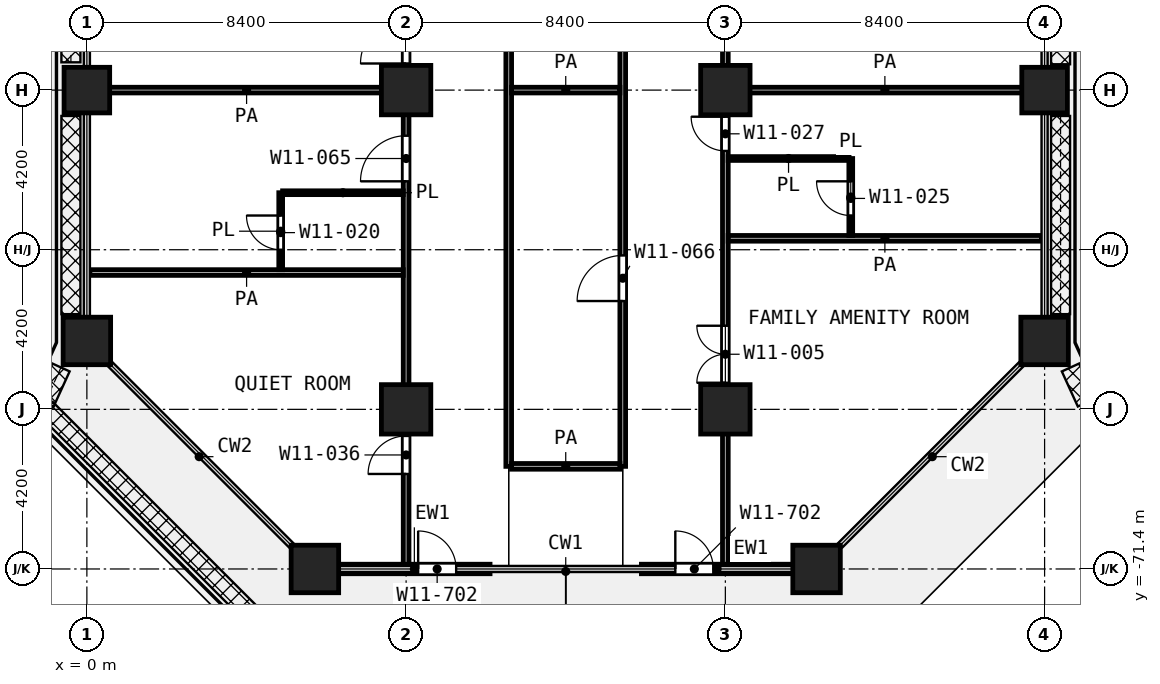
"""IFC4 building model, lengths in metres.
Left out: names, types, materials, properties, quantities, classifications, styles, units other than length and angle.
Written with IfcOpenShell. Run it as: python <this file> out.ifc"""

import sys

from ifc_helpers import new_model, si_unit, direction, frame, frame_2d, origin, origin_2d, place, context, subcontext, project, spatial, rectangle, extrude, element, fill, save


model = new_model("IFC4")
c1 = context("Model", 3, precision=1e-05, world=origin(), true_north=direction((0.0, 1.0)))
c2 = subcontext(c1, "Body", "Model", "MODEL_VIEW")
j1 = project(units=[si_unit("LENGTHUNIT", "METRE"), si_unit("PLANEANGLEUNIT", "RADIAN")], contexts=[c1])
p1 = place(None, origin())
s1 = spatial("IfcSite", under=j1, at=p1, CompositionType="ELEMENT")
p2 = place(p1, origin())
s2 = spatial("IfcBuilding", under=s1, at=p2, CompositionType="ELEMENT")
p3 = place(p2, frame((0.0, 0.0, 72.8)))
s3 = spatial("IfcBuildingStorey", under=s2, at=p3, CompositionType="ELEMENT", Elevation=72.8)
p4 = place(p3, frame((0.0, -58.8, 0.0), z_axis=(0.0, 0.0, 1.0), x_axis=(1.0, 0.0, 0.0)))
e1 = element("IfcColumn", 1, at=p4, inside=s3, PredefinedType="COLUMN", context=c2, shape_type="SweptSolid", body=[
    extrude(rectangle(XDim=1.2, YDim=1.2, at=origin_2d()), origin(), (0.0, 0.0, 1.0), 4.2),
])
for number, where, z_axis, x_axis in (
    (2, (8.4, -58.8, 0.0), (0.0, 0.0, 1.0), (1.0, 0.0, 0.0)),
    (3, (16.8, -58.8, 0.0), (0.0, 0.0, 1.0), (1.0, 0.0, 0.0)),
):
    element("IfcColumn", number, at=place(p3, frame(where, z_axis=z_axis, x_axis=x_axis)), inside=s3, PredefinedType="COLUMN", context=c2, shape_type="SweptSolid", body=[
        extrude(rectangle(XDim=1.3, YDim=1.3, at=origin_2d()), origin(), (0.0, 0.0, 1.0), 4.2),
    ])
p5 = place(p3, frame((25.2, -58.8, 0.0), z_axis=(0.0, 0.0, 1.0), x_axis=(1.0, 0.0, 0.0)))
e4 = element("IfcColumn", 4, at=p5, inside=s3, PredefinedType="COLUMN", context=c2, shape_type="SweptSolid", body=[
    extrude(rectangle(XDim=1.2, YDim=1.2, at=origin_2d()), origin(), (0.0, 0.0, 1.0), 4.2),
])
for number, where, z_axis, x_axis in (
    (5, (0.0, -65.4, 0.0), (0.0, 0.0, 1.0), (1.0, 0.0, 0.0)),
    (6, (25.2, -65.4, 0.0), (0.0, 0.0, 1.0), (1.0, 0.0, 0.0)),
):
    element("IfcColumn", number, at=place(p3, frame(where, z_axis=z_axis, x_axis=x_axis)), inside=s3, PredefinedType="COLUMN", context=c2, shape_type="SweptSolid", body=[
        extrude(rectangle(XDim=1.25, YDim=1.25, at=origin_2d()), origin(), (0.0, 0.0, 1.0), 4.2),
    ])
for number, where, z_axis, x_axis in (
    (7, (8.4, -67.2, 0.0), (0.0, 0.0, 1.0), (1.0, 0.0, 0.0)),
    (8, (16.8, -67.2, 0.0), (0.0, 0.0, 1.0), (1.0, 0.0, 0.0)),
):
    element("IfcColumn", number, at=place(p3, frame(where, z_axis=z_axis, x_axis=x_axis)), inside=s3, PredefinedType="COLUMN", context=c2, shape_type="SweptSolid", body=[
        extrude(rectangle(XDim=1.3, YDim=1.3, at=origin_2d()), origin(), (0.0, 0.0, 1.0), 4.2),
    ])
for number, where, z_axis, x_axis in (
    (9, (6.0, -71.4, 0.0), (0.0, 0.0, 1.0), (1.0, 0.0, 0.0)),
    (10, (19.2, -71.4, 0.0), (0.0, 0.0, 1.0), (1.0, 0.0, 0.0)),
):
    element("IfcColumn", number, at=place(p3, frame(where, z_axis=z_axis, x_axis=x_axis)), inside=s3, PredefinedType="COLUMN", context=c2, shape_type="SweptSolid", body=[
        extrude(rectangle(XDim=1.25, YDim=1.25, at=origin_2d()), origin(), (0.0, 0.0, 1.0), 4.2),
    ])
p6 = place(p3, frame((6.625, -71.4, 0.0), z_axis=(0.0, 0.0, 1.0), x_axis=(1.0, 0.0, 0.0)))
e11 = element("IfcWall", 11, at=p6, inside=s3, PredefinedType="SOLIDWALL", context=c2, shape_type="SweptSolid", body=[
    extrude(rectangle(XDim=3.983, YDim=0.25, at=frame_2d((1.992, 0.0))), origin(), (0.0, 0.0, 1.0), 3.78),
])
p7 = place(p6, frame((2.092, 0.0, 0.0)))
e12 = element("IfcOpeningElement", 12, at=p7, cuts=e11, PredefinedType="OPENING", context=c2, shape_type="SweptSolid", body=[
    extrude(rectangle(XDim=1.0, YDim=2.1, at=frame_2d((0.5, 1.05))), frame((0.0, 0.135, 0.0), z_axis=(0.0, -1.0, 0.0), x_axis=(1.0, 0.0, 0.0)), (0.0, 0.0, 1.0), 0.27),
])
p8 = place(p3, frame((14.592, -71.4, 0.0), z_axis=(0.0, 0.0, 1.0), x_axis=(1.0, 0.0, 0.0)))
e13 = element("IfcWall", 13, at=p8, inside=s3, PredefinedType="SOLIDWALL", context=c2, shape_type="SweptSolid", body=[
    extrude(rectangle(XDim=3.983, YDim=0.25, at=frame_2d((1.992, 0.0))), origin(), (0.0, 0.0, 1.0), 3.78),
])
p9 = place(p8, frame((0.892, 0.0, 0.0)))
e14 = element("IfcOpeningElement", 14, at=p9, cuts=e13, PredefinedType="OPENING", context=c2, shape_type="SweptSolid", body=[
    extrude(rectangle(XDim=1.0, YDim=2.1, at=frame_2d((0.5, 1.05))), frame((0.0, 0.135, 0.0), z_axis=(0.0, -1.0, 0.0), x_axis=(1.0, 0.0, 0.0)), (0.0, 0.0, 1.0), 0.27),
])
for number, where, z_axis, x_axis in (
    (15, (5.15, -61.5, 0.0), (0.0, 0.0, 1.0), (1.0, 0.0, 0.0)),
    (16, (16.875, -60.6, 0.0), (0.0, 0.0, 1.0), (1.0, 0.0, 0.0)),
):
    element("IfcWall", number, at=place(p3, frame(where, z_axis=z_axis, x_axis=x_axis)), inside=s3, PredefinedType="PARTITIONING", context=c2, shape_type="SweptSolid", body=[
        extrude(rectangle(XDim=3.175, YDim=0.1, at=frame_2d((1.587, 0.0))), origin(), (0.0, 0.0, 1.0), 3.9),
    ])
p10 = place(p3, frame((5.1, -63.525, 0.0), z_axis=(0.0, 0.0, 1.0), x_axis=(0.0, 1.0, 0.0)))
e17 = element("IfcWall", 17, at=p10, inside=s3, PredefinedType="PARTITIONING", context=c2, shape_type="SweptSolid", body=[
    extrude(rectangle(XDim=2.025, YDim=0.1, at=frame_2d((1.012, 0.0))), origin(), (0.0, 0.0, 1.0), 3.9),
])
p11 = place(p10, frame((0.525, 0.0, 0.0)))
e18 = element("IfcOpeningElement", 18, at=p11, cuts=e17, PredefinedType="OPENING", context=c2, shape_type="SweptSolid", body=[
    extrude(rectangle(XDim=0.9, YDim=2.1, at=frame_2d((0.45, 1.05))), frame((0.0, 0.06, 0.0), z_axis=(0.0, -1.0, 0.0), x_axis=(1.0, 0.0, 0.0)), (0.0, 0.0, 1.0), 0.12),
])
p12 = place(p3, frame((20.1, -62.625, 0.0), z_axis=(0.0, 0.0, 1.0), x_axis=(0.0, 1.0, 0.0)))
e19 = element("IfcWall", 19, at=p12, inside=s3, PredefinedType="PARTITIONING", context=c2, shape_type="SweptSolid", body=[
    extrude(rectangle(XDim=2.025, YDim=0.1, at=frame_2d((1.012, 0.0))), origin(), (0.0, 0.0, 1.0), 3.9),
])
p13 = place(p12, frame((0.525, 0.0, 0.0)))
e20 = element("IfcOpeningElement", 20, at=p13, cuts=e19, PredefinedType="OPENING", context=c2, shape_type="SweptSolid", body=[
    extrude(rectangle(XDim=0.9, YDim=2.1, at=frame_2d((0.45, 1.05))), frame((0.0, 0.06, 0.0), z_axis=(0.0, -1.0, 0.0), x_axis=(1.0, 0.0, 0.0)), (0.0, 0.0, 1.0), 0.12),
])
p14 = place(p3, frame((11.175, -68.7, 0.0), z_axis=(0.0, 0.0, 1.0), x_axis=(1.0, 0.0, 0.0)))
e21 = element("IfcWall", 21, at=p14, inside=s3, PredefinedType="PARTITIONING", context=c2, shape_type="SweptSolid", body=[
    extrude(rectangle(XDim=2.85, YDim=0.15, at=frame_2d((1.425, 0.0))), origin(), (0.0, 0.0, 1.0), 3.9),
])
p15 = place(p3, frame((0.08, -63.6, 0.0), z_axis=(0.0, 0.0, 1.0), x_axis=(1.0, 0.0, 0.0)))
e22 = element("IfcWall", 22, at=p15, inside=s3, PredefinedType="PARTITIONING", context=c2, shape_type="SweptSolid", body=[
    extrude(rectangle(XDim=8.245, YDim=0.15, at=frame_2d((4.123, 0.0))), origin(), (0.0, 0.0, 1.0), 3.9),
])
p16 = place(p3, frame((16.875, -62.7, 0.0), z_axis=(0.0, 0.0, 1.0), x_axis=(1.0, 0.0, 0.0)))
e23 = element("IfcWall", 23, at=p16, inside=s3, PredefinedType="PARTITIONING", context=c2, shape_type="SweptSolid", body=[
    extrude(rectangle(XDim=8.245, YDim=0.15, at=frame_2d((4.123, 0.0))), origin(), (0.0, 0.0, 1.0), 3.9),
])
p17 = place(p3, frame((0.08, -58.8, 0.0), z_axis=(0.0, 0.0, 1.0), x_axis=(1.0, 0.0, 0.0)))
e24 = element("IfcWall", 24, at=p17, inside=s3, PredefinedType="PARTITIONING", context=c2, shape_type="SweptSolid", body=[
    extrude(rectangle(XDim=8.245, YDim=0.15, at=frame_2d((4.123, 0.0))), origin(), (0.0, 0.0, 1.0), 3.9),
])
p18 = place(p3, frame((11.175, -58.8, 0.0), z_axis=(0.0, 0.0, 1.0), x_axis=(1.0, 0.0, 0.0)))
e25 = element("IfcWall", 25, at=p18, inside=s3, PredefinedType="PARTITIONING", context=c2, shape_type="SweptSolid", body=[
    extrude(rectangle(XDim=2.85, YDim=0.15, at=frame_2d((1.425, 0.0))), origin(), (0.0, 0.0, 1.0), 3.9),
])
p19 = place(p3, frame((16.875, -58.8, 0.0), z_axis=(0.0, 0.0, 1.0), x_axis=(1.0, 0.0, 0.0)))
e26 = element("IfcWall", 26, at=p19, inside=s3, PredefinedType="PARTITIONING", context=c2, shape_type="SweptSolid", body=[
    extrude(rectangle(XDim=8.245, YDim=0.15, at=frame_2d((4.123, 0.0))), origin(), (0.0, 0.0, 1.0), 3.9),
])
p20 = place(p3, frame((8.4, -71.32, 0.0), z_axis=(0.0, 0.0, 1.0), x_axis=(0.0, 1.0, 0.0)))
e27 = element("IfcWall", 27, at=p20, inside=s3, PredefinedType="PARTITIONING", context=c2, shape_type="SweptSolid", body=[
    extrude(rectangle(XDim=28.97, YDim=0.15, at=frame_2d((14.485, 0.0))), origin(), (0.0, 0.0, 1.0), 3.9),
])
p21 = place(p20, frame((22.82, 0.0, 0.0)))
e28 = element("IfcOpeningElement", 28, at=p21, cuts=e27, PredefinedType="OPENING", context=c2, shape_type="SweptSolid", body=[
    extrude(rectangle(XDim=1.0, YDim=2.1, at=frame_2d((0.5, 1.05))), frame((0.0, 0.085, 0.0), z_axis=(0.0, -1.0, 0.0), x_axis=(1.0, 0.0, 0.0)), (0.0, 0.0, 1.0), 0.17),
])
p22 = place(p20, frame((19.02, 0.0, 0.0)))
e29 = element("IfcOpeningElement", 29, at=p22, cuts=e27, PredefinedType="OPENING", context=c2, shape_type="SweptSolid", body=[
    extrude(rectangle(XDim=1.2, YDim=2.1, at=frame_2d((0.6, 1.05))), frame((0.0, 0.085, 0.0), z_axis=(0.0, -1.0, 0.0), x_axis=(1.0, 0.0, 0.0)), (0.0, 0.0, 1.0), 0.17),
])
p23 = place(p20, frame((13.22, 0.0, 0.0)))
e30 = element("IfcOpeningElement", 30, at=p23, cuts=e27, PredefinedType="OPENING", context=c2, shape_type="SweptSolid", body=[
    extrude(rectangle(XDim=1.2, YDim=2.1, at=frame_2d((0.6, 1.05))), frame((0.0, 0.085, 0.0), z_axis=(0.0, -1.0, 0.0), x_axis=(1.0, 0.0, 0.0)), (0.0, 0.0, 1.0), 0.17),
])
p24 = place(p20, frame((10.12, 0.0, 0.0)))
e31 = element("IfcOpeningElement", 31, at=p24, cuts=e27, PredefinedType="OPENING", context=c2, shape_type="SweptSolid", body=[
    extrude(rectangle(XDim=1.2, YDim=2.1, at=frame_2d((0.6, 1.05))), frame((0.0, 0.085, 0.0), z_axis=(0.0, -1.0, 0.0), x_axis=(1.0, 0.0, 0.0)), (0.0, 0.0, 1.0), 0.17),
])
p25 = place(p20, frame((2.42, 0.0, 0.0)))
e32 = element("IfcOpeningElement", 32, at=p25, cuts=e27, PredefinedType="OPENING", context=c2, shape_type="SweptSolid", body=[
    extrude(rectangle(XDim=1.0, YDim=2.1, at=frame_2d((0.5, 1.05))), frame((0.0, 0.085, 0.0), z_axis=(0.0, -1.0, 0.0), x_axis=(1.0, 0.0, 0.0)), (0.0, 0.0, 1.0), 0.17),
])
p26 = place(p3, frame((11.1, -68.7, 0.0), z_axis=(0.0, 0.0, 1.0), x_axis=(0.0, 1.0, 0.0)))
e33 = element("IfcWall", 33, at=p26, inside=s3, PredefinedType="PARTITIONING", context=c2, shape_type="SweptSolid", body=[
    extrude(rectangle(XDim=39.3, YDim=0.15, at=frame_2d((19.65, 0.0))), origin(), (0.0, 0.0, 1.0), 3.9),
])
p27 = place(p26, frame((34.75, 0.0, 0.0)))
e34 = element("IfcOpeningElement", 34, at=p27, cuts=e33, PredefinedType="OPENING", context=c2, shape_type="SweptSolid", body=[
    extrude(rectangle(XDim=1.0, YDim=2.1, at=frame_2d((0.5, 1.05))), frame((0.0, 0.085, 0.0), z_axis=(0.0, -1.0, 0.0), x_axis=(1.0, 0.0, 0.0)), (0.0, 0.0, 1.0), 0.17),
])
p28 = place(p26, frame((24.25, 0.0, 0.0)))
e35 = element("IfcOpeningElement", 35, at=p28, cuts=e33, PredefinedType="OPENING", context=c2, shape_type="SweptSolid", body=[
    extrude(rectangle(XDim=1.0, YDim=2.1, at=frame_2d((0.5, 1.05))), frame((0.0, 0.085, 0.0), z_axis=(0.0, -1.0, 0.0), x_axis=(1.0, 0.0, 0.0)), (0.0, 0.0, 1.0), 0.17),
])
p29 = place(p26, frame((16.0, 0.0, 0.0)))
e36 = element("IfcOpeningElement", 36, at=p29, cuts=e33, PredefinedType="OPENING", context=c2, shape_type="SweptSolid", body=[
    extrude(rectangle(XDim=1.0, YDim=2.1, at=frame_2d((0.5, 1.05))), frame((0.0, 0.085, 0.0), z_axis=(0.0, -1.0, 0.0), x_axis=(1.0, 0.0, 0.0)), (0.0, 0.0, 1.0), 0.17),
])
p30 = place(p26, frame((11.85, 0.0, 0.0)))
e37 = element("IfcOpeningElement", 37, at=p30, cuts=e33, PredefinedType="OPENING", context=c2, shape_type="SweptSolid", body=[
    extrude(rectangle(XDim=0.9, YDim=2.1, at=frame_2d((0.45, 1.05))), frame((0.0, 0.085, 0.0), z_axis=(0.0, -1.0, 0.0), x_axis=(1.0, 0.0, 0.0)), (0.0, 0.0, 1.0), 0.17),
])
p31 = place(p3, frame((14.1, -68.7, 0.0), z_axis=(0.0, 0.0, 1.0), x_axis=(0.0, 1.0, 0.0)))
e38 = element("IfcWall", 38, at=p31, inside=s3, PredefinedType="PARTITIONING", context=c2, shape_type="SweptSolid", body=[
    extrude(rectangle(XDim=39.3, YDim=0.15, at=frame_2d((19.65, 0.0))), origin(), (0.0, 0.0, 1.0), 3.9),
])
p32 = place(p31, frame((4.35, 0.0, 0.0)))
e39 = element("IfcOpeningElement", 39, at=p32, cuts=e38, PredefinedType="OPENING", context=c2, shape_type="SweptSolid", body=[
    extrude(rectangle(XDim=1.2, YDim=2.1, at=frame_2d((0.6, 1.05))), frame((0.0, 0.085, 0.0), z_axis=(0.0, -1.0, 0.0), x_axis=(1.0, 0.0, 0.0)), (0.0, 0.0, 1.0), 0.17),
])
p33 = place(p3, frame((16.8, -71.32, 0.0), z_axis=(0.0, 0.0, 1.0), x_axis=(0.0, 1.0, 0.0)))
e40 = element("IfcWall", 40, at=p33, inside=s3, PredefinedType="PARTITIONING", context=c2, shape_type="SweptSolid", body=[
    extrude(rectangle(XDim=46.22, YDim=0.15, at=frame_2d((23.11, 0.0))), origin(), (0.0, 0.0, 1.0), 3.9),
])
p34 = place(p33, frame((38.42, 0.0, 0.0)))
e41 = element("IfcOpeningElement", 41, at=p34, cuts=e40, PredefinedType="OPENING", context=c2, shape_type="SweptSolid", body=[
    extrude(rectangle(XDim=1.0, YDim=2.1, at=frame_2d((0.5, 1.05))), frame((0.0, 0.085, 0.0), z_axis=(0.0, -1.0, 0.0), x_axis=(1.0, 0.0, 0.0)), (0.0, 0.0, 1.0), 0.17),
])
p35 = place(p33, frame((30.22, 0.0, 0.0)))
e42 = element("IfcOpeningElement", 42, at=p35, cuts=e40, PredefinedType="OPENING", context=c2, shape_type="SweptSolid", body=[
    extrude(rectangle(XDim=1.2, YDim=2.1, at=frame_2d((0.6, 1.05))), frame((0.0, 0.085, 0.0), z_axis=(0.0, -1.0, 0.0), x_axis=(1.0, 0.0, 0.0)), (0.0, 0.0, 1.0), 0.17),
])
p36 = place(p33, frame((27.42, 0.0, 0.0)))
e43 = element("IfcOpeningElement", 43, at=p36, cuts=e40, PredefinedType="OPENING", context=c2, shape_type="SweptSolid", body=[
    extrude(rectangle(XDim=1.2, YDim=2.1, at=frame_2d((0.6, 1.05))), frame((0.0, 0.085, 0.0), z_axis=(0.0, -1.0, 0.0), x_axis=(1.0, 0.0, 0.0)), (0.0, 0.0, 1.0), 0.17),
])
p37 = place(p33, frame((25.57, 0.0, 0.0)))
e44 = element("IfcOpeningElement", 44, at=p37, cuts=e40, PredefinedType="OPENING", context=c2, shape_type="SweptSolid", body=[
    extrude(rectangle(XDim=1.2, YDim=2.1, at=frame_2d((0.6, 1.05))), frame((0.0, 0.085, 0.0), z_axis=(0.0, -1.0, 0.0), x_axis=(1.0, 0.0, 0.0)), (0.0, 0.0, 1.0), 0.17),
])
p38 = place(p33, frame((21.62, 0.0, 0.0)))
e45 = element("IfcOpeningElement", 45, at=p38, cuts=e40, PredefinedType="OPENING", context=c2, shape_type="SweptSolid", body=[
    extrude(rectangle(XDim=1.2, YDim=2.1, at=frame_2d((0.6, 1.05))), frame((0.0, 0.085, 0.0), z_axis=(0.0, -1.0, 0.0), x_axis=(1.0, 0.0, 0.0)), (0.0, 0.0, 1.0), 0.17),
])
p39 = place(p33, frame((14.32, 0.0, 0.0)))
e46 = element("IfcOpeningElement", 46, at=p39, cuts=e40, PredefinedType="OPENING", context=c2, shape_type="SweptSolid", body=[
    extrude(rectangle(XDim=1.2, YDim=2.1, at=frame_2d((0.6, 1.05))), frame((0.0, 0.085, 0.0), z_axis=(0.0, -1.0, 0.0), x_axis=(1.0, 0.0, 0.0)), (0.0, 0.0, 1.0), 0.17),
])
p40 = place(p33, frame((18.52, 0.0, 0.0)))
e47 = element("IfcOpeningElement", 47, at=p40, cuts=e40, PredefinedType="OPENING", context=c2, shape_type="SweptSolid", body=[
    extrude(rectangle(XDim=1.2, YDim=2.1, at=frame_2d((0.6, 1.05))), frame((0.0, 0.085, 0.0), z_axis=(0.0, -1.0, 0.0), x_axis=(1.0, 0.0, 0.0)), (0.0, 0.0, 1.0), 0.17),
])
p41 = place(p33, frame((10.92, 0.0, 0.0)))
e48 = element("IfcOpeningElement", 48, at=p41, cuts=e40, PredefinedType="OPENING", context=c2, shape_type="SweptSolid", body=[
    extrude(rectangle(XDim=0.9, YDim=2.1, at=frame_2d((0.45, 1.05))), frame((0.0, 0.085, 0.0), z_axis=(0.0, -1.0, 0.0), x_axis=(1.0, 0.0, 0.0)), (0.0, 0.0, 1.0), 0.17),
])
p42 = place(p33, frame((4.82, 0.0, 0.0)))
e49 = element("IfcOpeningElement", 49, at=p42, cuts=e40, PredefinedType="OPENING", context=c2, shape_type="SweptSolid", body=[
    extrude(rectangle(XDim=1.5, YDim=2.1, at=frame_2d((0.75, 1.05))), frame((0.0, 0.085, 0.0), z_axis=(0.0, -1.0, 0.0), x_axis=(1.0, 0.0, 0.0)), (0.0, 0.0, 1.0), 0.17),
])
p43 = place(p7, origin())
e50 = element("IfcDoor", 50, at=p43, inside=s3, OperationType="SINGLE_SWING_LEFT", PredefinedType="DOOR", context=c2, shape_type="SweptSolid", body=[
    extrude(rectangle(XDim=1.0, YDim=2.1, at=frame_2d((0.5, 1.05))), frame((0.0, 0.025, 0.0), z_axis=(0.0, -1.0, 0.0), x_axis=(1.0, 0.0, 0.0)), (0.0, 0.0, 1.0), 0.05),
])
fill(e12, e50)
p44 = place(p9, origin())
e51 = element("IfcDoor", 51, at=p44, inside=s3, OperationType="SINGLE_SWING_LEFT", PredefinedType="DOOR", context=c2, shape_type="SweptSolid", body=[
    extrude(rectangle(XDim=1.0, YDim=2.1, at=frame_2d((0.5, 1.05))), frame((0.0, 0.025, 0.0), z_axis=(0.0, -1.0, 0.0), x_axis=(1.0, 0.0, 0.0)), (0.0, 0.0, 1.0), 0.05),
])
fill(e14, e51)
p45 = place(p23, origin())
e52 = element("IfcDoor", 52, at=p45, inside=s3, OperationType="SINGLE_SWING_LEFT", PredefinedType="DOOR", context=c2, shape_type="SweptSolid", body=[
    extrude(rectangle(XDim=1.2, YDim=2.1, at=frame_2d((0.6, 1.05))), frame((0.0, 0.025, 0.0), z_axis=(0.0, -1.0, 0.0), x_axis=(1.0, 0.0, 0.0)), (0.0, 0.0, 1.0), 0.05),
])
fill(e30, e52)
p46 = place(p24, origin())
e53 = element("IfcDoor", 53, at=p46, inside=s3, OperationType="SINGLE_SWING_LEFT", PredefinedType="DOOR", context=c2, shape_type="SweptSolid", body=[
    extrude(rectangle(XDim=1.2, YDim=2.1, at=frame_2d((0.6, 1.05))), frame((0.0, 0.025, 0.0), z_axis=(0.0, -1.0, 0.0), x_axis=(1.0, 0.0, 0.0)), (0.0, 0.0, 1.0), 0.05),
])
fill(e31, e53)
p47 = place(p11, origin())
e54 = element("IfcDoor", 54, at=p47, inside=s3, OperationType="SINGLE_SWING_RIGHT", PredefinedType="DOOR", context=c2, shape_type="SweptSolid", body=[
    extrude(rectangle(XDim=0.9, YDim=2.1, at=frame_2d((0.45, 1.05))), frame((0.0, 0.025, 0.0), z_axis=(0.0, -1.0, 0.0), x_axis=(1.0, 0.0, 0.0)), (0.0, 0.0, 1.0), 0.05),
])
fill(e18, e54)
p48 = place(p25, origin())
e55 = element("IfcDoor", 55, at=p48, inside=s3, OperationType="SINGLE_SWING_LEFT", PredefinedType="DOOR", context=c2, shape_type="SweptSolid", body=[
    extrude(rectangle(XDim=1.0, YDim=2.1, at=frame_2d((0.5, 1.05))), frame((0.0, 0.025, 0.0), z_axis=(0.0, -1.0, 0.0), x_axis=(1.0, 0.0, 0.0)), (0.0, 0.0, 1.0), 0.05),
])
fill(e32, e55)
p49 = place(p32, origin())
e56 = element("IfcDoor", 56, at=p49, inside=s3, OperationType="SINGLE_SWING_LEFT", PredefinedType="DOOR", context=c2, shape_type="SweptSolid", body=[
    extrude(rectangle(XDim=1.2, YDim=2.1, at=frame_2d((0.6, 1.05))), frame((0.0, 0.025, 0.0), z_axis=(0.0, -1.0, 0.0), x_axis=(1.0, 0.0, 0.0)), (0.0, 0.0, 1.0), 0.05),
])
fill(e39, e56)
p50 = place(p41, origin())
e57 = element("IfcDoor", 57, at=p50, inside=s3, OperationType="SINGLE_SWING_RIGHT", PredefinedType="DOOR", context=c2, shape_type="SweptSolid", body=[
    extrude(rectangle(XDim=0.9, YDim=2.1, at=frame_2d((0.45, 1.05))), frame((0.0, 0.025, 0.0), z_axis=(0.0, -1.0, 0.0), x_axis=(1.0, 0.0, 0.0)), (0.0, 0.0, 1.0), 0.05),
])
fill(e48, e57)
p51 = place(p13, origin())
e58 = element("IfcDoor", 58, at=p51, inside=s3, OperationType="SINGLE_SWING_RIGHT", PredefinedType="DOOR", context=c2, shape_type="SweptSolid", body=[
    extrude(rectangle(XDim=0.9, YDim=2.1, at=frame_2d((0.45, 1.05))), frame((0.0, 0.025, 0.0), z_axis=(0.0, -1.0, 0.0), x_axis=(1.0, 0.0, 0.0)), (0.0, 0.0, 1.0), 0.05),
])
fill(e20, e58)
p52 = place(p42, origin())
e59 = element("IfcDoor", 59, at=p52, inside=s3, OperationType="DOUBLE_DOOR_SINGLE_SWING", PredefinedType="DOOR", context=c2, shape_type="SweptSolid", body=[
    extrude(rectangle(XDim=1.5, YDim=2.1, at=frame_2d((0.75, 1.05))), frame((0.0, 0.025, 0.0), z_axis=(0.0, -1.0, 0.0), x_axis=(1.0, 0.0, 0.0)), (0.0, 0.0, 1.0), 0.05),
])
fill(e49, e59)
save(model, sys.argv[1])
